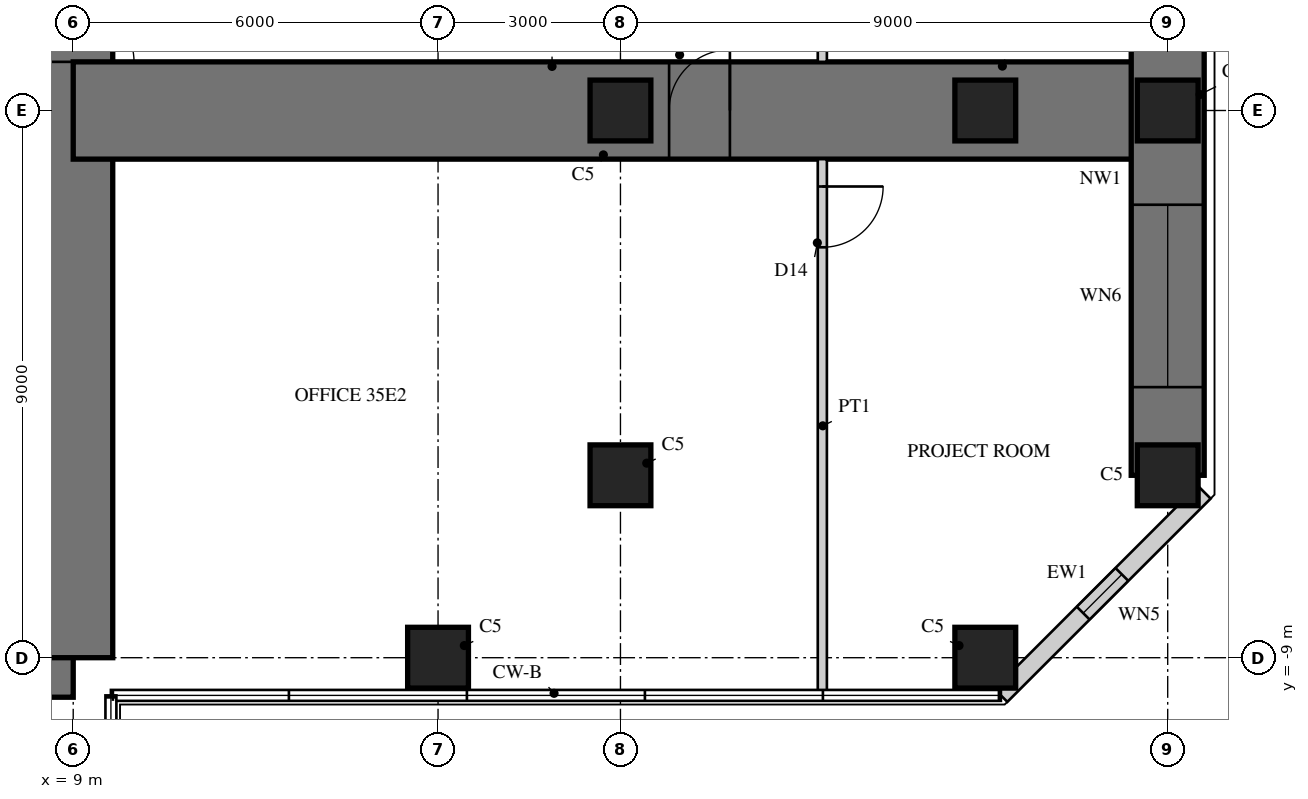
"""IFC4 building model, lengths in metres.
Left out: names, types, materials, properties, quantities, classifications, styles, units other than length and angle.
Written with IfcOpenShell. Run it as: python <this file> out.ifc"""

import sys

from ifc_helpers import new_model, si_unit, direction, frame, frame_2d, origin, origin_2d, place, context, subcontext, project, spatial, rectangle, hollow_rectangle, extrude, element, fill, save


model = new_model("IFC4")
c1 = context("Model", 3, precision=1e-05, world=origin(), true_north=direction((0.0, 1.0)))
c2 = subcontext(c1, "Body", "Model", "MODEL_VIEW")
j1 = project(units=[si_unit("LENGTHUNIT", "METRE"), si_unit("PLANEANGLEUNIT", "RADIAN")], contexts=[c1])
p1 = place(None, origin())
s1 = spatial("IfcSite", under=j1, at=p1, CompositionType="ELEMENT")
p2 = place(p1, origin())
s2 = spatial("IfcBuilding", under=s1, at=p2, CompositionType="ELEMENT")
p3 = place(p2, frame((0.0, 0.0, 144.5)))
s3 = spatial("IfcBuildingStorey", under=s2, at=p3, CompositionType="ELEMENT", Elevation=144.5)
p4 = place(p3, frame((-9.0, -9.0, 0.0), z_axis=(0.0, 0.0, 1.0), x_axis=(1.0, 0.0, 0.0)))
e1 = element("IfcWall", 1, at=p4, inside=s3, PredefinedType="SHEAR", context=c2, shape_type="SweptSolid", body=[
    extrude(rectangle(XDim=18.0, YDim=1.3, at=frame_2d((9.0, 0.0))), origin(), (0.0, 0.0, 1.0), 4.0),
])
p5 = place(p4, frame((9.8, 0.0, 0.0)))
e2 = element("IfcOpeningElement", 2, at=p5, cuts=e1, PredefinedType="OPENING", context=c2, shape_type="SweptSolid", body=[
    extrude(rectangle(XDim=1.0, YDim=2.4, at=frame_2d((0.5, 1.2))), frame((0.0, 0.66, 0.0), z_axis=(0.0, -1.0, 0.0), x_axis=(1.0, 0.0, 0.0)), (0.0, 0.0, 1.0), 1.32),
])
p6 = place(p3, frame((9.0, -9.0, 0.0), z_axis=(0.0, 0.0, 1.0), x_axis=(0.0, 1.0, 0.0)))
e3 = element("IfcWall", 3, at=p6, inside=s3, PredefinedType="SHEAR", context=c2, shape_type="SweptSolid", body=[
    extrude(rectangle(XDim=18.0, YDim=1.3, at=frame_2d((9.0, 0.0))), origin(), (0.0, 0.0, 1.0), 4.0),
])
p7 = place(p6, frame((9.8, 0.0, 0.0)))
e4 = element("IfcOpeningElement", 4, at=p7, cuts=e3, PredefinedType="OPENING", context=c2, shape_type="SweptSolid", body=[
    extrude(rectangle(XDim=1.0, YDim=2.4, at=frame_2d((0.5, 1.2))), frame((0.0, 0.66, 0.0), z_axis=(0.0, -1.0, 0.0), x_axis=(1.0, 0.0, 0.0)), (0.0, 0.0, 1.0), 1.32),
])
p8 = place(p3, frame((9.0, 0.0, 0.0), z_axis=(0.0, 0.0, 1.0), x_axis=(1.0, 0.0, 0.0)))
e5 = element("IfcWall", 5, at=p8, inside=s3, PredefinedType="SHEAR", context=c2, shape_type="SweptSolid", body=[
    extrude(rectangle(XDim=18.0, YDim=1.6, at=frame_2d((9.0, 0.0))), origin(), (0.0, 0.0, 1.0), 4.0),
])
p9 = place(p8, frame((9.8, 0.0, 0.0)))
e6 = element("IfcOpeningElement", 6, at=p9, cuts=e5, PredefinedType="OPENING", context=c2, shape_type="SweptSolid", body=[
    extrude(rectangle(XDim=1.0, YDim=2.2, at=frame_2d((0.5, 1.1))), frame((0.0, 0.81, 0.0), z_axis=(0.0, -1.0, 0.0), x_axis=(1.0, 0.0, 0.0)), (0.0, 0.0, 1.0), 1.62),
])
p10 = place(p3, frame((27.0, -6.0, 0.0), z_axis=(0.0, 0.0, 1.0), x_axis=(0.0, 1.0, 0.0)))
e7 = element("IfcWall", 7, at=p10, inside=s3, PredefinedType="SHEAR", context=c2, shape_type="SweptSolid", body=[
    extrude(rectangle(XDim=12.0, YDim=1.2, at=frame_2d((6.0, 0.0))), origin(), (0.0, 0.0, 1.0), 4.0),
])
p11 = place(p10, frame((1.45, 0.0, 0.6)))
e8 = element("IfcOpeningElement", 8, at=p11, cuts=e7, PredefinedType="OPENING", context=c2, shape_type="SweptSolid", body=[
    extrude(rectangle(XDim=3.0, YDim=2.4, at=frame_2d((1.5, 1.2))), frame((0.0, 0.61, 0.0), z_axis=(0.0, -1.0, 0.0), x_axis=(1.0, 0.0, 0.0)), (0.0, 0.0, 1.0), 1.22),
])
p12 = place(p10, frame((7.55, 0.0, 0.6)))
e9 = element("IfcOpeningElement", 9, at=p12, cuts=e7, PredefinedType="OPENING", context=c2, shape_type="SweptSolid", body=[
    extrude(rectangle(XDim=3.0, YDim=2.4, at=frame_2d((1.5, 1.2))), frame((0.0, 0.61, 0.0), z_axis=(0.0, -1.0, 0.0), x_axis=(1.0, 0.0, 0.0)), (0.0, 0.0, 1.0), 1.22),
])
for number, where, z_axis, x_axis in (
    (10, (15.0, -9.0, 0.0), (0.0, 0.0, 1.0), (1.0, 0.0, 0.0)),
    (11, (24.0, -9.0, 0.0), (0.0, 0.0, 1.0), (1.0, 0.0, 0.0)),
    (12, (27.0, -6.0, 0.0), (0.0, 0.0, 1.0), (1.0, 0.0, 0.0)),
    (13, (27.0, 0.0, 0.0), (0.0, 0.0, 1.0), (1.0, 0.0, 0.0)),
    (14, (18.0, -6.0, 0.0), (0.0, 0.0, 1.0), (1.0, 0.0, 0.0)),
    (15, (18.0, 0.0, 0.0), (0.0, 0.0, 1.0), (1.0, 0.0, 0.0)),
    (16, (24.0, 0.0, 0.0), (0.0, 0.0, 1.0), (1.0, 0.0, 0.0)),
):
    element("IfcColumn", number, at=place(p3, frame(where, z_axis=z_axis, x_axis=x_axis)), inside=s3, PredefinedType="COLUMN", context=c2, shape_type="SweptSolid", body=[
        extrude(rectangle(XDim=1.0, YDim=1.0, at=origin_2d()), origin(), (0.0, 0.0, 1.0), 4.0),
    ])
p13 = place(p3, frame((24.257, -9.62, 0.0), z_axis=(0.0, 0.0, 1.0), x_axis=(0.707106781187, 0.707106781187, 0.0)))
e17 = element("IfcWall", 17, at=p13, inside=s3, PredefinedType="SOLIDWALL", context=c2, shape_type="SweptSolid", body=[
    extrude(rectangle(XDim=4.728, YDim=0.3, at=frame_2d((2.364, 0.0))), origin(), (0.0, 0.0, 1.0), 3.8),
])
p14 = place(p13, frame((1.914, 0.0, 0.3)))
e18 = element("IfcOpeningElement", 18, at=p14, cuts=e17, PredefinedType="OPENING", context=c2, shape_type="SweptSolid", body=[
    extrude(rectangle(XDim=0.9, YDim=2.4, at=frame_2d((0.45, 1.2))), frame((0.0, 0.16, 0.0), z_axis=(0.0, -1.0, 0.0), x_axis=(1.0, 0.0, 0.0)), (0.0, 0.0, 1.0), 0.32),
])
p15 = place(p3, frame((21.32, 0.8, 0.0), z_axis=(0.0, 0.0, 1.0), x_axis=(0.0, 1.0, 0.0)))
e19 = element("IfcWall", 19, at=p15, inside=s3, PredefinedType="PARTITIONING", context=c2, shape_type="SweptSolid", body=[
    extrude(rectangle(XDim=8.78, YDim=0.15, at=frame_2d((4.39, 0.0))), origin(), (0.0, 0.0, 1.0), 3.8),
])
p16 = place(p15, frame((0.45, 0.0, 0.0)))
e20 = element("IfcOpeningElement", 20, at=p16, cuts=e19, PredefinedType="OPENING", context=c2, shape_type="SweptSolid", body=[
    extrude(rectangle(XDim=1.0, YDim=2.2, at=frame_2d((0.5, 1.1))), frame((0.0, 0.085, 0.0), z_axis=(0.0, -1.0, 0.0), x_axis=(1.0, 0.0, 0.0)), (0.0, 0.0, 1.0), 0.17),
])
p17 = place(p3, frame((21.32, -9.58, 0.0), z_axis=(0.0, 0.0, 1.0), x_axis=(0.0, 1.0, 0.0)))
e21 = element("IfcWall", 21, at=p17, inside=s3, PredefinedType="PARTITIONING", context=c2, shape_type="SweptSolid", body=[
    extrude(rectangle(XDim=8.78, YDim=0.15, at=frame_2d((4.39, 0.0))), origin(), (0.0, 0.0, 1.0), 3.8),
])
p18 = place(p17, frame((7.33, 0.0, 0.0)))
e22 = element("IfcOpeningElement", 22, at=p18, cuts=e21, PredefinedType="OPENING", context=c2, shape_type="SweptSolid", body=[
    extrude(rectangle(XDim=1.0, YDim=2.2, at=frame_2d((0.5, 1.1))), frame((0.0, 0.085, 0.0), z_axis=(0.0, -1.0, 0.0), x_axis=(1.0, 0.0, 0.0)), (0.0, 0.0, 1.0), 0.17),
])
p19 = place(p14, origin())
e23 = element("IfcWindow", 23, at=p19, inside=s3, PartitioningType="SINGLE_PANEL", PredefinedType="WINDOW", context=c2, shape_type="SweptSolid", body=[
    extrude(hollow_rectangle(XDim=0.9, YDim=2.4, WallThickness=0.06, at=frame_2d((0.45, 1.2))), frame((0.0, 0.03, 0.0), z_axis=(0.0, -1.0, 0.0), x_axis=(1.0, 0.0, 0.0)), (0.0, 0.0, 1.0), 0.06),
    extrude(rectangle(XDim=0.779, YDim=2.279, at=frame_2d((0.45, 1.2))), frame((0.0, 0.03, 0.0), z_axis=(0.0, -1.0, 0.0), x_axis=(1.0, 0.0, 0.0)), (0.0, 0.0, 1.0), 0.06),
])
fill(e18, e23)
p20 = place(p11, origin())
e24 = element("IfcWindow", 24, at=p20, inside=s3, PartitioningType="SINGLE_PANEL", PredefinedType="WINDOW", context=c2, shape_type="SweptSolid", body=[
    extrude(hollow_rectangle(XDim=3.0, YDim=2.4, WallThickness=0.06, at=frame_2d((1.5, 1.2))), frame((0.0, 0.03, 0.0), z_axis=(0.0, -1.0, 0.0), x_axis=(1.0, 0.0, 0.0)), (0.0, 0.0, 1.0), 0.06),
    extrude(rectangle(XDim=2.879, YDim=2.279, at=frame_2d((1.5, 1.2))), frame((0.0, 0.03, 0.0), z_axis=(0.0, -1.0, 0.0), x_axis=(1.0, 0.0, 0.0)), (0.0, 0.0, 1.0), 0.06),
])
fill(e8, e24)
p21 = place(p18, frame((1.0, 0.0, 0.0), z_axis=(0.0, 0.0, 1.0), x_axis=(-1.0, 0.0, 0.0)))
e25 = element("IfcDoor", 25, at=p21, inside=s3, OperationType="SINGLE_SWING_LEFT", PredefinedType="DOOR", context=c2, shape_type="SweptSolid", body=[
    extrude(rectangle(XDim=1.0, YDim=2.2, at=frame_2d((0.5, 1.1))), frame((0.0, 0.025, 0.0), z_axis=(0.0, -1.0, 0.0), x_axis=(1.0, 0.0, 0.0)), (0.0, 0.0, 1.0), 0.05),
])
fill(e22, e25)
p22 = place(p9, origin())
e26 = element("IfcDoor", 26, at=p22, inside=s3, OperationType="SINGLE_SWING_RIGHT", PredefinedType="DOOR", context=c2, shape_type="SweptSolid", body=[
    extrude(rectangle(XDim=1.0, YDim=2.2, at=frame_2d((0.5, 1.1))), frame((0.0, 0.025, 0.0), z_axis=(0.0, -1.0, 0.0), x_axis=(1.0, 0.0, 0.0)), (0.0, 0.0, 1.0), 0.05),
])
fill(e6, e26)
p23 = place(p7, frame((1.0, 0.0, 0.0), z_axis=(0.0, 0.0, 1.0), x_axis=(-1.0, 0.0, 0.0)))
e27 = element("IfcDoor", 27, at=p23, inside=s3, OperationType="SINGLE_SWING_RIGHT", PredefinedType="DOOR", context=c2, shape_type="SweptSolid", body=[
    extrude(rectangle(XDim=1.0, YDim=2.4, at=frame_2d((0.5, 1.2))), frame((0.0, -0.005, 0.0), z_axis=(0.0, -1.0, 0.0), x_axis=(1.0, 0.0, 0.0)), (0.0, 0.0, 1.0), 0.05),
])
fill(e4, e27)
save(model, sys.argv[1])
